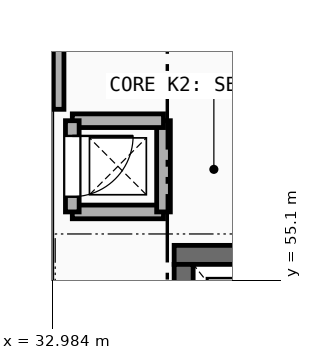
"""IFC4 building model, lengths in metres.
Left out: names, types, materials, properties, quantities, classifications, styles, units other than length and angle.
Written with IfcOpenShell. Run it as: python <this file> out.ifc"""

import sys

from ifc_helpers import new_model, si_unit, direction, frame, frame_2d, origin, place, context, subcontext, project, spatial, rectangle, extrude, element, fill, save


model = new_model("IFC4")
c1 = context("Model", 3, precision=1e-05, world=origin(), true_north=direction((0.0, 1.0)))
c2 = subcontext(c1, "Body", "Model", "MODEL_VIEW")
j1 = project(units=[si_unit("LENGTHUNIT", "METRE"), si_unit("PLANEANGLEUNIT", "RADIAN")], contexts=[c1])
p1 = place(None, origin())
s1 = spatial("IfcSite", under=j1, at=p1, CompositionType="ELEMENT")
p2 = place(p1, origin())
s2 = spatial("IfcBuilding", under=s1, at=p2, CompositionType="ELEMENT")
p3 = place(p2, frame((0.0, 0.0, 9.6)))
s3 = spatial("IfcBuildingStorey", under=s2, at=p3, CompositionType="ELEMENT", Elevation=9.6)
p4 = place(p3, frame((33.05, 57.35, 0.0), z_axis=(0.0, 0.0, 1.0), x_axis=(0.0, 1.0, 0.0)))
e1 = element("IfcWall", 1, at=p4, inside=s3, PredefinedType="PARTITIONING", context=c2, shape_type="SweptSolid", body=[
    extrude(rectangle(XDim=12.75, YDim=0.18, at=frame_2d((6.375, 0.0))), origin(), (0.0, 0.0, 1.0), 3.31),
])
p5 = place(p4, frame((5.875, 0.0, -0.01)))
e2 = element("IfcOpeningElement", 2, at=p5, cuts=e1, PredefinedType="OPENING", context=c2, shape_type="SweptSolid", body=[
    extrude(rectangle(XDim=1.0, YDim=2.16, at=frame_2d((0.5, 1.08))), frame((0.0, 0.1, 0.0), z_axis=(0.0, -1.0, 0.0), x_axis=(1.0, 0.0, 0.0)), (0.0, 0.0, 1.0), 0.2),
])
p6 = place(p3, frame((34.59, 55.435, 0.0), z_axis=(0.0, 0.0, 1.0), x_axis=(1.0, 0.0, 0.0)))
e3 = element("IfcWall", 3, at=p6, inside=s3, PredefinedType="SHEAR", context=c2, shape_type="SweptSolid", body=[
    extrude(rectangle(XDim=2.46, YDim=0.25, at=frame_2d((1.23, 0.0))), origin(), (0.0, 0.0, 1.0), 4.2),
])
p7 = place(p3, frame((34.715, 52.85, 0.0), z_axis=(0.0, 0.0, 1.0), x_axis=(0.0, 1.0, 0.0)))
e4 = element("IfcWall", 4, at=p7, inside=s3, PredefinedType="SHEAR", context=c2, shape_type="SweptSolid", body=[
    extrude(rectangle(XDim=2.46, YDim=0.25, at=frame_2d((1.23, 0.0))), origin(), (0.0, 0.0, 1.0), 4.2),
])
p8 = place(p7, frame((0.68, 0.0, -0.01)))
e5 = element("IfcOpeningElement", 5, at=p8, cuts=e4, PredefinedType="OPENING", context=c2, shape_type="SweptSolid", body=[
    extrude(rectangle(XDim=1.1, YDim=2.16, at=frame_2d((0.55, 1.08))), frame((0.0, 0.135, 0.0), z_axis=(0.0, -1.0, 0.0), x_axis=(1.0, 0.0, 0.0)), (0.0, 0.0, 1.0), 0.27),
])
for number, where, z_axis, x_axis in (
    (6, (33.25, 56.0, 0.0), (0.0, 0.0, 1.0), (1.0, 0.0, 0.0)),
    (7, (34.45, 56.0, 0.0), (0.0, 0.0, 1.0), (0.0, 1.0, 0.0)),
    (8, (34.45, 57.2, 0.0), (0.0, 0.0, 1.0), (-1.0, 0.0, 0.0)),
):
    element("IfcWall", number, at=place(p3, frame(where, z_axis=z_axis, x_axis=x_axis)), inside=s3, PredefinedType="SOLIDWALL", context=c2, shape_type="SweptSolid", body=[
        extrude(rectangle(XDim=1.2, YDim=0.18, at=frame_2d((0.6, 0.0))), origin(), (0.0, 0.0, 1.0), 3.97),
    ])
p9 = place(p3, frame((33.25, 57.2, 0.0), z_axis=(0.0, 0.0, 1.0), x_axis=(0.0, -1.0, 0.0)))
e9 = element("IfcWall", 9, at=p9, inside=s3, PredefinedType="SOLIDWALL", context=c2, shape_type="SweptSolid", body=[
    extrude(rectangle(XDim=1.2, YDim=0.18, at=frame_2d((0.6, 0.0))), origin(), (0.0, 0.0, 1.0), 3.97),
])
p10 = place(p9, frame((0.2, 0.0, -0.01)))
e10 = element("IfcOpeningElement", 10, at=p10, cuts=e9, PredefinedType="OPENING", context=c2, shape_type="SweptSolid", body=[
    extrude(rectangle(XDim=0.8, YDim=2.06, at=frame_2d((0.4, 1.03))), frame((0.0, 0.1, 0.0), z_axis=(0.0, -1.0, 0.0), x_axis=(1.0, 0.0, 0.0)), (0.0, 0.0, 1.0), 0.2),
])
p11 = place(p10, frame((0.0, 0.0, 0.01)))
e11 = element("IfcDoor", 11, at=p11, inside=s3, OperationType="SINGLE_SWING_LEFT", PredefinedType="DOOR", context=c2, shape_type="SweptSolid", body=[
    extrude(rectangle(XDim=0.8, YDim=2.05, at=frame_2d((0.4, 1.025))), frame((0.0, 0.025, 0.0), z_axis=(0.0, -1.0, 0.0), x_axis=(1.0, 0.0, 0.0)), (0.0, 0.0, 1.0), 0.05),
])
fill(e10, e11)
save(model, sys.argv[1])
